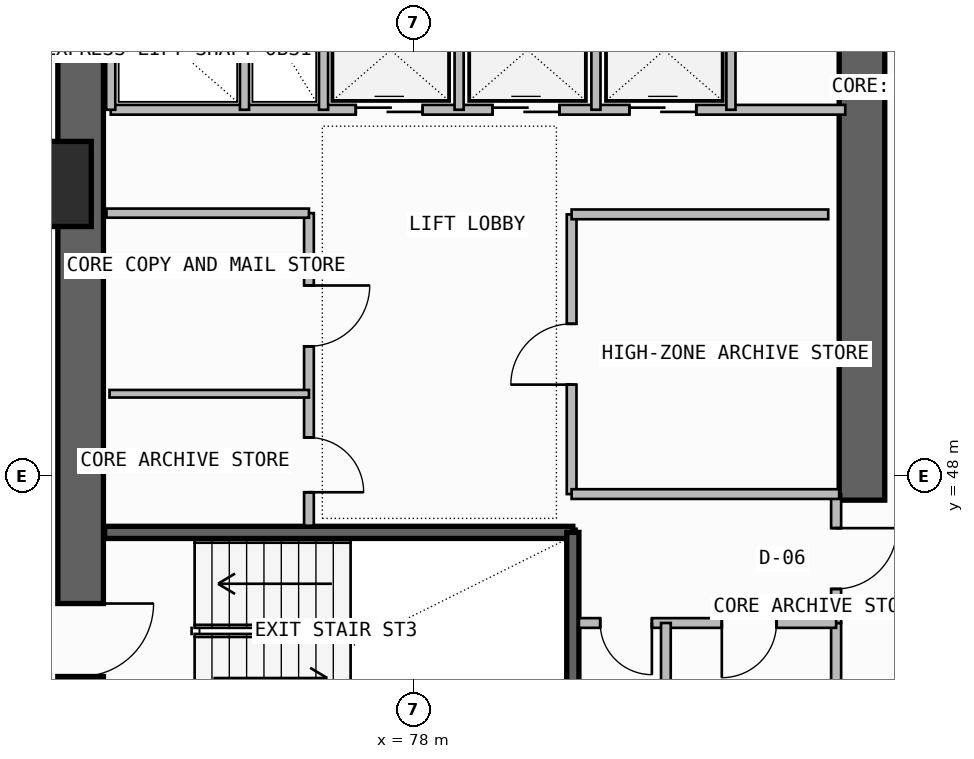
"""IFC4 building model, lengths in metres.
Left out: names, types, materials, properties, quantities, classifications, styles, units other than length and angle.
Written with IfcOpenShell. Run it as: python <this file> out.ifc"""

import sys

from ifc_helpers import new_model, si_unit, direction, frame, frame_2d, origin, origin_2d, place, context, subcontext, project, spatial, rectangle, extrude, element, fill, save


model = new_model("IFC4")
c1 = context("Model", 3, precision=1e-05, world=origin(), true_north=direction((0.0, 1.0)))
c2 = subcontext(c1, "Body", "Model", "MODEL_VIEW")
j1 = project(units=[si_unit("LENGTHUNIT", "METRE"), si_unit("PLANEANGLEUNIT", "RADIAN")], contexts=[c1])
p1 = place(None, origin())
s1 = spatial("IfcSite", under=j1, at=p1, CompositionType="ELEMENT")
p2 = place(p1, origin())
s2 = spatial("IfcBuilding", under=s1, at=p2, CompositionType="ELEMENT")
p3 = place(p2, frame((0.0, 0.0, 214.98)))
s3 = spatial("IfcBuildingStorey", under=s2, at=p3, CompositionType="ELEMENT", Elevation=214.98)
p4 = place(p3, frame((72.525, 43.35, -0.26), z_axis=(0.0, 0.0, 1.0), x_axis=(0.0, 1.0, 0.0)))
e1 = element("IfcWall", 1, at=p4, inside=s3, PredefinedType="SHEAR", context=c2, shape_type="SweptSolid", body=[
    extrude(rectangle(XDim=12.7, YDim=0.75, at=frame_2d((6.35, 0.0))), origin(), (0.0, 0.0, 1.0), 3.52),
])
p5 = place(p4, frame((1.35, 0.0, 0.26)))
e2 = element("IfcOpeningElement", 2, at=p5, cuts=e1, PredefinedType="OPENING", context=c2, shape_type="SweptSolid", body=[
    extrude(rectangle(XDim=1.2, YDim=2.2, at=frame_2d((0.6, 1.1))), frame((0.0, 0.385, 0.0), z_axis=(0.0, -1.0, 0.0), x_axis=(1.0, 0.0, 0.0)), (0.0, 0.0, 1.0), 0.77),
])
p6 = place(p3, frame((85.375, 47.6, -0.26), z_axis=(0.0, 0.0, 1.0), x_axis=(0.0, 1.0, 0.0)))
e3 = element("IfcWall", 3, at=p6, inside=s3, PredefinedType="SHEAR", context=c2, shape_type="SweptSolid", body=[
    extrude(rectangle(XDim=8.45, YDim=0.75, at=frame_2d((4.225, 0.0))), origin(), (0.0, 0.0, 1.0), 3.52),
])
p7 = place(p3, frame((72.0, 52.8, 0.0), z_axis=(0.0, 0.0, 1.0), x_axis=(1.0, 0.0, 0.0)))
e4 = element("IfcColumn", 4, at=p7, inside=s3, PredefinedType="COLUMN", context=c2, shape_type="SweptSolid", body=[
    extrude(rectangle(XDim=1.4, YDim=1.4, at=origin_2d()), origin(), (0.0, 0.0, 1.0), 3.52),
])
p8 = place(p3, frame((72.92, 47.07, -0.26), z_axis=(0.0, 0.0, 1.0), x_axis=(1.0, 0.0, 0.0)))
e5 = element("IfcWall", 5, at=p8, inside=s3, PredefinedType="SOLIDWALL", context=c2, shape_type="SweptSolid", body=[
    extrude(rectangle(XDim=7.7, YDim=0.2, at=frame_2d((3.85, 0.0))), origin(), (0.0, 0.0, 1.0), 3.52),
])
p9 = place(p3, frame((80.62, 43.83, -0.26), z_axis=(0.0, 0.0, 1.0), x_axis=(0.0, 1.0, 0.0)))
e6 = element("IfcWall", 6, at=p9, inside=s3, PredefinedType="SOLIDWALL", context=c2, shape_type="SweptSolid", body=[
    extrude(rectangle(XDim=3.24, YDim=0.2, at=frame_2d((1.62, 0.0))), origin(), (0.0, 0.0, 1.0), 3.52),
])
p10 = place(p3, frame((84.95, 43.68, 0.0), z_axis=(0.0, 0.0, 1.0), x_axis=(0.0, 1.0, 0.0)))
e7 = element("IfcWall", 7, at=p10, inside=s3, PredefinedType="PLUMBINGWALL", context=c2, shape_type="SweptSolid", body=[
    extrude(rectangle(XDim=1.9, YDim=0.165, at=frame_2d((0.95, 0.0))), origin(), (0.0, 0.0, 1.0), 3.26),
])
p11 = place(p3, frame((84.95, 45.58, 0.0), z_axis=(0.0, 0.0, 1.0), x_axis=(0.0, 1.0, 0.0)))
e8 = element("IfcWall", 8, at=p11, inside=s3, PredefinedType="PARTITIONING", context=c2, shape_type="SweptSolid", body=[
    extrude(rectangle(XDim=2.12, YDim=0.165, at=frame_2d((1.06, 0.0))), origin(), (0.0, 0.0, 1.0), 3.26),
])
p12 = place(p11, frame((0.56, 0.0, 0.0)))
e9 = element("IfcOpeningElement", 9, at=p12, cuts=e8, PredefinedType="OPENING", context=c2, shape_type="SweptSolid", body=[
    extrude(rectangle(XDim=1.0, YDim=2.2, at=frame_2d((0.5, 1.1))), frame((0.0, 0.093, 0.0), z_axis=(0.0, -1.0, 0.0), x_axis=(1.0, 0.0, 0.0)), (0.0, 0.0, 1.0), 0.185),
])
p13 = place(p3, frame((80.72, 45.58, 0.0), z_axis=(0.0, 0.0, 1.0), x_axis=(1.0, 0.0, 0.0)))
e10 = element("IfcWall", 10, at=p13, inside=s3, PredefinedType="PLUMBINGWALL", context=c2, shape_type="SweptSolid", body=[
    extrude(rectangle(XDim=4.23, YDim=0.16, at=frame_2d((2.115, 0.0))), origin(), (0.0, 0.0, 1.0), 3.26),
])
p14 = place(p13, frame((0.35, 0.0, 0.0)))
e11 = element("IfcOpeningElement", 11, at=p14, cuts=e10, PredefinedType="OPENING", context=c2, shape_type="SweptSolid", body=[
    extrude(rectangle(XDim=0.85, YDim=2.05, at=frame_2d((0.425, 1.025))), frame((0.0, 0.09, 0.0), z_axis=(0.0, -1.0, 0.0), x_axis=(1.0, 0.0, 0.0)), (0.0, 0.0, 1.0), 0.18),
])
p15 = place(p13, frame((2.35, 0.0, 0.0)))
e12 = element("IfcOpeningElement", 12, at=p15, cuts=e10, PredefinedType="OPENING", context=c2, shape_type="SweptSolid", body=[
    extrude(rectangle(XDim=0.9, YDim=2.1, at=frame_2d((0.45, 1.05))), frame((0.0, 0.09, 0.0), z_axis=(0.0, -1.0, 0.0), x_axis=(1.0, 0.0, 0.0)), (0.0, 0.0, 1.0), 0.18),
])
p16 = place(p3, frame((82.15, 43.68, 0.0), z_axis=(0.0, 0.0, 1.0), x_axis=(0.0, 1.0, 0.0)))
e13 = element("IfcWall", 13, at=p16, inside=s3, PredefinedType="PLUMBINGWALL", context=c2, shape_type="SweptSolid", body=[
    extrude(rectangle(XDim=1.9, YDim=0.16, at=frame_2d((0.95, 0.0))), origin(), (0.0, 0.0, 1.0), 3.26),
])
p17 = place(p3, frame((76.28, 47.18, 0.0), z_axis=(0.0, 0.0, 1.0), x_axis=(0.0, 1.0, 0.0)))
e14 = element("IfcWall", 14, at=p17, inside=s3, PredefinedType="SOLIDWALL", context=c2, shape_type="SweptSolid", body=[
    extrude(rectangle(XDim=5.14, YDim=0.16, at=frame_2d((2.57, 0.0))), origin(), (0.0, 0.0, 1.0), 3.26),
])
p18 = place(p17, frame((0.55, 0.0, 0.0)))
e15 = element("IfcOpeningElement", 15, at=p18, cuts=e14, PredefinedType="OPENING", context=c2, shape_type="SweptSolid", body=[
    extrude(rectangle(XDim=0.9, YDim=2.1, at=frame_2d((0.45, 1.05))), frame((0.0, 0.09, 0.0), z_axis=(0.0, -1.0, 0.0), x_axis=(1.0, 0.0, 0.0)), (0.0, 0.0, 1.0), 0.18),
])
p19 = place(p17, frame((2.95, 0.0, 0.0)))
e16 = element("IfcOpeningElement", 16, at=p19, cuts=e14, PredefinedType="OPENING", context=c2, shape_type="SweptSolid", body=[
    extrude(rectangle(XDim=1.0, YDim=2.2, at=frame_2d((0.5, 1.1))), frame((0.0, 0.09, 0.0), z_axis=(0.0, -1.0, 0.0), x_axis=(1.0, 0.0, 0.0)), (0.0, 0.0, 1.0), 0.18),
])
p20 = place(p3, frame((72.95, 52.32, 0.0), z_axis=(0.0, 0.0, 1.0), x_axis=(1.0, 0.0, 0.0)))
e17 = element("IfcWall", 17, at=p20, inside=s3, PredefinedType="SOLIDWALL", context=c2, shape_type="SweptSolid", body=[
    extrude(rectangle(XDim=3.33, YDim=0.15, at=frame_2d((1.665, 0.0))), origin(), (0.0, 0.0, 1.0), 3.26),
])
p21 = place(p3, frame((73.0, 49.35, 0.0), z_axis=(0.0, 0.0, 1.0), x_axis=(1.0, 0.0, 0.0)))
e18 = element("IfcWall", 18, at=p21, inside=s3, PredefinedType="PARTITIONING", context=c2, shape_type="SweptSolid", body=[
    extrude(rectangle(XDim=3.28, YDim=0.125, at=frame_2d((1.64, 0.0))), origin(), (0.0, 0.0, 1.0), 3.26),
])
p22 = place(p3, frame((80.6, 47.7, 0.0), z_axis=(0.0, 0.0, 1.0), x_axis=(0.0, 1.0, 0.0)))
e19 = element("IfcWall", 19, at=p22, inside=s3, PredefinedType="SOLIDWALL", context=c2, shape_type="SweptSolid", body=[
    extrude(rectangle(XDim=4.6, YDim=0.16, at=frame_2d((2.3, 0.0))), origin(), (0.0, 0.0, 1.0), 3.26),
])
p23 = place(p22, frame((1.8, 0.0, 0.0)))
e20 = element("IfcOpeningElement", 20, at=p23, cuts=e19, PredefinedType="OPENING", context=c2, shape_type="SweptSolid", body=[
    extrude(rectangle(XDim=1.0, YDim=2.2, at=frame_2d((0.5, 1.1))), frame((0.0, 0.09, 0.0), z_axis=(0.0, -1.0, 0.0), x_axis=(1.0, 0.0, 0.0)), (0.0, 0.0, 1.0), 0.18),
])
p24 = place(p3, frame((80.6, 47.7, 0.0), z_axis=(0.0, 0.0, 1.0), x_axis=(1.0, 0.0, 0.0)))
e21 = element("IfcWall", 21, at=p24, inside=s3, PredefinedType="SOLIDWALL", context=c2, shape_type="SweptSolid", body=[
    extrude(rectangle(XDim=4.4, YDim=0.16, at=frame_2d((2.2, 0.0))), origin(), (0.0, 0.0, 1.0), 3.26),
])
p25 = place(p3, frame((80.6, 52.3, 0.0), z_axis=(0.0, 0.0, 1.0), x_axis=(1.0, 0.0, 0.0)))
e22 = element("IfcWall", 22, at=p25, inside=s3, PredefinedType="SOLIDWALL", context=c2, shape_type="SweptSolid", body=[
    extrude(rectangle(XDim=4.22, YDim=0.16, at=frame_2d((2.11, 0.0))), origin(), (0.0, 0.0, 1.0), 3.26),
])
p26 = place(p3, frame((73.02, 54.02, 0.0), z_axis=(0.0, 0.0, 1.0), x_axis=(1.0, 0.0, 0.0)))
e23 = element("IfcWall", 23, at=p26, inside=s3, PredefinedType="SOLIDWALL", context=c2, shape_type="SweptSolid", body=[
    extrude(rectangle(XDim=12.08, YDim=0.16, at=frame_2d((6.04, 0.0))), origin(), (0.0, 0.0, 1.0), 3.26),
])
p27 = place(p26, frame((4.03, 0.0, 0.0)))
e24 = element("IfcOpeningElement", 24, at=p27, cuts=e23, PredefinedType="OPENING", context=c2, shape_type="SweptSolid", body=[
    extrude(rectangle(XDim=1.1, YDim=2.25, at=frame_2d((0.55, 1.125))), frame((0.0, 0.09, 0.0), z_axis=(0.0, -1.0, 0.0), x_axis=(1.0, 0.0, 0.0)), (0.0, 0.0, 1.0), 0.18),
])
p28 = place(p26, frame((6.28, 0.0, 0.0)))
e25 = element("IfcOpeningElement", 25, at=p28, cuts=e23, PredefinedType="OPENING", context=c2, shape_type="SweptSolid", body=[
    extrude(rectangle(XDim=1.1, YDim=2.25, at=frame_2d((0.55, 1.125))), frame((0.0, 0.09, 0.0), z_axis=(0.0, -1.0, 0.0), x_axis=(1.0, 0.0, 0.0)), (0.0, 0.0, 1.0), 0.18),
])
p29 = place(p26, frame((8.53, 0.0, 0.0)))
e26 = element("IfcOpeningElement", 26, at=p29, cuts=e23, PredefinedType="OPENING", context=c2, shape_type="SweptSolid", body=[
    extrude(rectangle(XDim=1.1, YDim=2.25, at=frame_2d((0.55, 1.125))), frame((0.0, 0.09, 0.0), z_axis=(0.0, -1.0, 0.0), x_axis=(1.0, 0.0, 0.0)), (0.0, 0.0, 1.0), 0.18),
])
p30 = place(p3, frame((73.02, 54.02, 0.0), z_axis=(0.0, 0.0, 1.0), x_axis=(0.0, 1.0, 0.0)))
e27 = element("IfcWall", 27, at=p30, inside=s3, PredefinedType="PLUMBINGWALL", context=c2, shape_type="SweptSolid", body=[
    extrude(rectangle(XDim=1.94, YDim=0.15, at=frame_2d((0.97, 0.0))), origin(), (0.0, 0.0, 1.0), 3.26),
])
p31 = place(p3, frame((76.52, 54.02, 0.0), z_axis=(0.0, 0.0, 1.0), x_axis=(0.0, 1.0, 0.0)))
e28 = element("IfcWall", 28, at=p31, inside=s3, PredefinedType="SOLIDWALL", context=c2, shape_type="SweptSolid", body=[
    extrude(rectangle(XDim=1.94, YDim=0.15, at=frame_2d((0.97, 0.0))), origin(), (0.0, 0.0, 1.0), 3.26),
])
p32 = place(p3, frame((75.22, 54.02, 0.0), z_axis=(0.0, 0.0, 1.0), x_axis=(0.0, 1.0, 0.0)))
e29 = element("IfcWall", 29, at=p32, inside=s3, PredefinedType="PLUMBINGWALL", context=c2, shape_type="SweptSolid", body=[
    extrude(rectangle(XDim=1.94, YDim=0.15, at=frame_2d((0.97, 0.0))), origin(), (0.0, 0.0, 1.0), 3.26),
])
for number, where, z_axis, x_axis in (
    (30, (78.75, 54.02, 0.0), (0.0, 0.0, 1.0), (0.0, 1.0, 0.0)),
    (31, (81.0, 54.02, 0.0), (0.0, 0.0, 1.0), (0.0, 1.0, 0.0)),
):
    element("IfcWall", number, at=place(p3, frame(where, z_axis=z_axis, x_axis=x_axis)), inside=s3, PredefinedType="PLUMBINGWALL", context=c2, shape_type="SweptSolid", body=[
        extrude(rectangle(XDim=1.96, YDim=0.15, at=frame_2d((0.98, 0.0))), origin(), (0.0, 0.0, 1.0), 3.26),
    ])
p33 = place(p3, frame((83.22, 54.02, 0.0), z_axis=(0.0, 0.0, 1.0), x_axis=(0.0, 1.0, 0.0)))
e32 = element("IfcWall", 32, at=p33, inside=s3, PredefinedType="SOLIDWALL", context=c2, shape_type="SweptSolid", body=[
    extrude(rectangle(XDim=1.96, YDim=0.15, at=frame_2d((0.98, 0.0))), origin(), (0.0, 0.0, 1.0), 3.26),
])
p34 = place(p5, frame((1.2, 0.0, 0.0), z_axis=(0.0, 0.0, 1.0), x_axis=(-1.0, 0.0, 0.0)))
e33 = element("IfcDoor", 33, at=p34, inside=s3, OperationType="SINGLE_SWING_LEFT", PredefinedType="USERDEFINED", context=c2, shape_type="SweptSolid", body=[
    extrude(rectangle(XDim=1.2, YDim=2.2, at=frame_2d((0.6, 1.1))), frame((0.0, 0.025, 0.0), z_axis=(0.0, -1.0, 0.0), x_axis=(1.0, 0.0, 0.0)), (0.0, 0.0, 1.0), 0.05),
])
fill(e2, e33)
p35 = place(p12, frame((1.0, 0.0, 0.0), z_axis=(0.0, 0.0, 1.0), x_axis=(-1.0, 0.0, 0.0)))
e34 = element("IfcDoor", 34, at=p35, inside=s3, OperationType="SINGLE_SWING_LEFT", PredefinedType="DOOR", context=c2, shape_type="SweptSolid", body=[
    extrude(rectangle(XDim=1.0, YDim=2.2, at=frame_2d((0.5, 1.1))), frame((0.0, 0.025, 0.0), z_axis=(0.0, -1.0, 0.0), x_axis=(1.0, 0.0, 0.0)), (0.0, 0.0, 1.0), 0.05),
])
fill(e9, e34)
p36 = place(p14, frame((0.85, 0.0, 0.0), z_axis=(0.0, 0.0, 1.0), x_axis=(-1.0, 0.0, 0.0)))
e35 = element("IfcDoor", 35, at=p36, inside=s3, OperationType="SINGLE_SWING_LEFT", PredefinedType="DOOR", context=c2, shape_type="SweptSolid", body=[
    extrude(rectangle(XDim=0.85, YDim=2.05, at=frame_2d((0.425, 1.025))), frame((0.0, 0.025, 0.0), z_axis=(0.0, -1.0, 0.0), x_axis=(1.0, 0.0, 0.0)), (0.0, 0.0, 1.0), 0.05),
])
fill(e11, e35)
p37 = place(p15, frame((0.9, 0.0, 0.0), z_axis=(0.0, 0.0, 1.0), x_axis=(-1.0, 0.0, 0.0)))
e36 = element("IfcDoor", 36, at=p37, inside=s3, OperationType="SINGLE_SWING_RIGHT", PredefinedType="DOOR", context=c2, shape_type="SweptSolid", body=[
    extrude(rectangle(XDim=0.9, YDim=2.1, at=frame_2d((0.45, 1.05))), frame((0.0, 0.025, 0.0), z_axis=(0.0, -1.0, 0.0), x_axis=(1.0, 0.0, 0.0)), (0.0, 0.0, 1.0), 0.05),
])
fill(e12, e36)
p38 = place(p18, frame((0.9, 0.0, 0.0), z_axis=(0.0, 0.0, 1.0), x_axis=(-1.0, 0.0, 0.0)))
e37 = element("IfcDoor", 37, at=p38, inside=s3, OperationType="SINGLE_SWING_RIGHT", PredefinedType="DOOR", context=c2, shape_type="SweptSolid", body=[
    extrude(rectangle(XDim=0.9, YDim=2.1, at=frame_2d((0.45, 1.05))), frame((0.0, 0.025, 0.0), z_axis=(0.0, -1.0, 0.0), x_axis=(1.0, 0.0, 0.0)), (0.0, 0.0, 1.0), 0.05),
])
fill(e15, e37)
p39 = place(p19, frame((1.0, 0.0, 0.0), z_axis=(0.0, 0.0, 1.0), x_axis=(-1.0, 0.0, 0.0)))
e38 = element("IfcDoor", 38, at=p39, inside=s3, OperationType="SINGLE_SWING_LEFT", PredefinedType="DOOR", context=c2, shape_type="SweptSolid", body=[
    extrude(rectangle(XDim=1.0, YDim=2.2, at=frame_2d((0.5, 1.1))), frame((0.0, 0.025, 0.0), z_axis=(0.0, -1.0, 0.0), x_axis=(1.0, 0.0, 0.0)), (0.0, 0.0, 1.0), 0.05),
])
fill(e16, e38)
p40 = place(p23, origin())
e39 = element("IfcDoor", 39, at=p40, inside=s3, OperationType="SINGLE_SWING_LEFT", PredefinedType="DOOR", context=c2, shape_type="SweptSolid", body=[
    extrude(rectangle(XDim=1.0, YDim=2.2, at=frame_2d((0.5, 1.1))), frame((0.0, 0.025, 0.0), z_axis=(0.0, -1.0, 0.0), x_axis=(1.0, 0.0, 0.0)), (0.0, 0.0, 1.0), 0.05),
])
fill(e20, e39)
p41 = place(p27, origin())
e40 = element("IfcDoor", 40, at=p41, inside=s3, OperationType="DOUBLE_DOOR_SLIDING", PredefinedType="DOOR", context=c2, shape_type="SweptSolid", body=[
    extrude(rectangle(XDim=1.1, YDim=2.25, at=frame_2d((0.55, 1.125))), frame((0.0, 0.025, 0.0), z_axis=(0.0, -1.0, 0.0), x_axis=(1.0, 0.0, 0.0)), (0.0, 0.0, 1.0), 0.05),
])
fill(e24, e40)
p42 = place(p28, origin())
e41 = element("IfcDoor", 41, at=p42, inside=s3, OperationType="DOUBLE_DOOR_SLIDING", PredefinedType="DOOR", context=c2, shape_type="SweptSolid", body=[
    extrude(rectangle(XDim=1.1, YDim=2.25, at=frame_2d((0.55, 1.125))), frame((0.0, 0.025, 0.0), z_axis=(0.0, -1.0, 0.0), x_axis=(1.0, 0.0, 0.0)), (0.0, 0.0, 1.0), 0.05),
])
fill(e25, e41)
p43 = place(p29, origin())
e42 = element("IfcDoor", 42, at=p43, inside=s3, OperationType="DOUBLE_DOOR_SLIDING", PredefinedType="DOOR", context=c2, shape_type="SweptSolid", body=[
    extrude(rectangle(XDim=1.1, YDim=2.25, at=frame_2d((0.55, 1.125))), frame((0.0, 0.025, 0.0), z_axis=(0.0, -1.0, 0.0), x_axis=(1.0, 0.0, 0.0)), (0.0, 0.0, 1.0), 0.05),
])
fill(e26, e42)
save(model, sys.argv[1])
